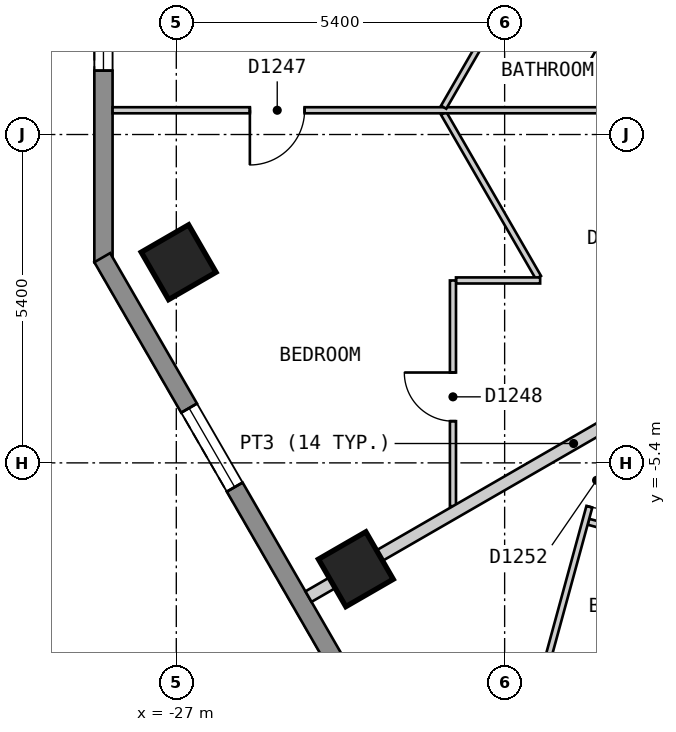
"""IFC4 building model, lengths in metres.
Left out: names, types, materials, properties, quantities, classifications, styles, units other than length and angle.
Written with IfcOpenShell. Run it as: python <this file> out.ifc"""

import sys

from ifc_helpers import new_model, si_unit, direction, frame, frame_2d, origin, origin_2d, place, context, subcontext, project, spatial, polyline, rectangle, outline, extrude, element, fill, save


model = new_model("IFC4")
c1 = context("Model", 3, precision=1e-05, world=origin(), true_north=direction((0.0, 1.0)))
c2 = subcontext(c1, "Body", "Model", "MODEL_VIEW")
j1 = project(units=[si_unit("LENGTHUNIT", "METRE"), si_unit("PLANEANGLEUNIT", "RADIAN")], contexts=[c1])
p1 = place(None, origin())
s1 = spatial("IfcSite", under=j1, at=p1, CompositionType="ELEMENT")
p2 = place(p1, origin())
s2 = spatial("IfcBuilding", under=s1, at=p2, CompositionType="ELEMENT")
p3 = place(p2, frame((0.0, 0.0, 117.6)))
s3 = spatial("IfcBuildingStorey", under=s2, at=p3, CompositionType="ELEMENT", Elevation=117.6)
for number, where, z_axis, x_axis in (
    (1, (-26.962, -2.1, 0.0), (0.0, 0.0, 1.0), (0.5, -0.866, 0.0)),
    (2, (-24.047, -7.149, 0.0), (0.0, 0.0, 1.0), (0.5, -0.866, 0.0)),
):
    element("IfcColumn", number, at=place(p3, frame(where, z_axis=z_axis, x_axis=x_axis)), inside=s3, PredefinedType="COLUMN", context=c2, shape_type="SweptSolid", body=[
        extrude(rectangle(XDim=0.9, YDim=0.9, at=origin_2d()), origin(), (0.0, 0.0, 1.0), 3.0),
    ])
p4 = place(p3, frame((-28.198, 2.9, 0.0), z_axis=(0.0, 0.0, 1.0), x_axis=(0.0, -1.0, 0.0)))
e3 = element("IfcWall", 3, at=p4, inside=s3, PredefinedType="SOLIDWALL", context=c2, shape_type="SweptSolid", body=[
    extrude(outline(polyline([(0.0, -0.15), (5.0, -0.15), (4.92, 0.15), (0.08, 0.15), (0.0, -0.15)])), origin(), (0.0, 0.0, 1.0), 2.7),
])
p5 = place(p4, frame((0.65, 0.0, 0.15)))
e4 = element("IfcOpeningElement", 4, at=p5, cuts=e3, PredefinedType="OPENING", context=c2, shape_type="SweptSolid", body=[
    extrude(rectangle(XDim=1.2, YDim=2.1, at=frame_2d((0.6, 1.05))), frame((0.0, 0.16, 0.0), z_axis=(0.0, -1.0, 0.0), x_axis=(1.0, 0.0, 0.0)), (0.0, 0.0, 1.0), 0.32),
])
p6 = place(p3, frame((-28.218, -2.025, 0.0), z_axis=(0.0, 0.0, 1.0), x_axis=(0.500017503135, -0.866015298109, 0.0)))
e5 = element("IfcWall", 5, at=p6, inside=s3, PredefinedType="SOLIDWALL", context=c2, shape_type="SweptSolid", body=[
    extrude(outline(polyline([(0.0, -0.15), (24.711, -0.15), (24.631, 0.15), (0.08, 0.15), (0.0, -0.15)])), origin(), (0.0, 0.0, 1.0), 2.7),
])
p7 = place(p6, frame((2.857, 0.0, 0.15)))
e6 = element("IfcOpeningElement", 6, at=p7, cuts=e5, PredefinedType="OPENING", context=c2, shape_type="SweptSolid", body=[
    extrude(rectangle(XDim=1.5, YDim=2.1, at=frame_2d((0.75, 1.05))), frame((0.0, 0.16, 0.0), z_axis=(0.0, -1.0, 0.0), x_axis=(1.0, 0.0, 0.0)), (0.0, 0.0, 1.0), 0.32),
])
p8 = place(p6, frame((8.689, 0.0, 0.15)))
e7 = element("IfcOpeningElement", 7, at=p8, cuts=e5, PredefinedType="OPENING", context=c2, shape_type="SweptSolid", body=[
    extrude(rectangle(XDim=1.5, YDim=2.1, at=frame_2d((0.75, 1.05))), frame((0.0, 0.16, 0.0), z_axis=(0.0, -1.0, 0.0), x_axis=(1.0, 0.0, 0.0)), (0.0, 0.0, 1.0), 0.32),
])
p9 = place(p6, frame((14.52, 0.0, 0.15)))
e8 = element("IfcOpeningElement", 8, at=p9, cuts=e5, PredefinedType="OPENING", context=c2, shape_type="SweptSolid", body=[
    extrude(rectangle(XDim=1.5, YDim=2.1, at=frame_2d((0.75, 1.05))), frame((0.0, 0.16, 0.0), z_axis=(0.0, -1.0, 0.0), x_axis=(1.0, 0.0, 0.0)), (0.0, 0.0, 1.0), 0.32),
])
p10 = place(p6, frame((20.351, 0.0, 0.15)))
e9 = element("IfcOpeningElement", 9, at=p10, cuts=e5, PredefinedType="OPENING", context=c2, shape_type="SweptSolid", body=[
    extrude(rectangle(XDim=1.5, YDim=2.1, at=frame_2d((0.75, 1.05))), frame((0.0, 0.16, 0.0), z_axis=(0.0, -1.0, 0.0), x_axis=(1.0, 0.0, 0.0)), (0.0, 0.0, 1.0), 0.32),
])
p11 = place(p3, frame((-22.603, 0.349, 0.0), z_axis=(0.0, 0.0, 1.0), x_axis=(0.499930403552, -0.866065581584, 0.0)))
e10 = element("IfcWall", 10, at=p11, inside=s3, PredefinedType="PARTITIONING", context=c2, shape_type="SweptSolid", body=[
    extrude(rectangle(XDim=3.117, YDim=0.1, at=frame_2d((1.558, 0.0))), origin(), (0.0, 0.0, 1.0), 2.7),
])
p12 = place(p3, frame((-20.222, -6.368, 0.0), z_axis=(0.0, 0.0, 1.0), x_axis=(0.964827681618, -0.262883139024, 0.0)))
e11 = element("IfcWall", 11, at=p12, inside=s3, PredefinedType="PARTITIONING", context=c2, shape_type="SweptSolid", body=[
    extrude(rectangle(XDim=1.94, YDim=0.1, at=frame_2d((0.97, 0.0))), origin(), (0.0, 0.0, 1.0), 2.7),
])
p13 = place(p12, frame((0.597, 0.0, 0.0)))
e12 = element("IfcOpeningElement", 12, at=p13, cuts=e11, PredefinedType="OPENING", context=c2, shape_type="SweptSolid", body=[
    extrude(rectangle(XDim=0.8, YDim=2.1, at=frame_2d((0.4, 1.05))), frame((0.0, 0.06, 0.0), z_axis=(0.0, -1.0, 0.0), x_axis=(1.0, 0.0, 0.0)), (0.0, 0.0, 1.0), 0.12),
])
p14 = place(p3, frame((-21.231, 2.726, 0.0), z_axis=(0.0, 0.0, 1.0), x_axis=(0.867314299312, -0.497760892607, 0.0)))
e13 = element("IfcWall", 13, at=p14, inside=s3, PredefinedType="PARTITIONING", context=c2, shape_type="SweptSolid", body=[
    extrude(rectangle(XDim=4.05, YDim=0.1, at=frame_2d((2.025, 0.0))), origin(), (0.0, 0.0, 1.0), 2.7),
])
p15 = place(p14, frame((1.65, 0.0, 0.0)))
e14 = element("IfcOpeningElement", 14, at=p15, cuts=e13, PredefinedType="OPENING", context=c2, shape_type="SweptSolid", body=[
    extrude(rectangle(XDim=0.8, YDim=2.1, at=frame_2d((0.4, 1.05))), frame((0.0, 0.06, 0.0), z_axis=(0.0, -1.0, 0.0), x_axis=(1.0, 0.0, 0.0)), (0.0, 0.0, 1.0), 0.12),
])
p16 = place(p3, frame((-22.4, -2.4, 0.0), z_axis=(0.0, 0.0, 1.0), x_axis=(1.0, 0.0, 0.0)))
e15 = element("IfcWall", 15, at=p16, inside=s3, PredefinedType="PARTITIONING", context=c2, shape_type="SweptSolid", body=[
    extrude(rectangle(XDim=1.384, YDim=0.1, at=frame_2d((0.692, 0.0))), origin(), (0.0, 0.0, 1.0), 2.7),
])
p17 = place(p3, frame((-28.048, 0.399, 0.0), z_axis=(0.0, 0.0, 1.0), x_axis=(1.0, 0.0, 0.0)))
e16 = element("IfcWall", 16, at=p17, inside=s3, PredefinedType="PARTITIONING", context=c2, shape_type="SweptSolid", body=[
    extrude(rectangle(XDim=10.266, YDim=0.1, at=frame_2d((5.133, 0.0))), origin(), (0.0, 0.0, 1.0), 2.7),
])
p18 = place(p17, frame((2.258, 0.0, 0.0)))
e17 = element("IfcOpeningElement", 17, at=p18, cuts=e16, PredefinedType="OPENING", context=c2, shape_type="SweptSolid", body=[
    extrude(rectangle(XDim=0.9, YDim=2.1, at=frame_2d((0.45, 1.05))), frame((0.0, 0.06, 0.0), z_axis=(0.0, -1.0, 0.0), x_axis=(1.0, 0.0, 0.0)), (0.0, 0.0, 1.0), 0.12),
])
p19 = place(p3, frame((-22.603, 0.449, 0.0), z_axis=(0.0, 0.0, 1.0), x_axis=(0.500022588228, 0.866012362072, 0.0)))
e18 = element("IfcWall", 18, at=p19, inside=s3, PredefinedType="PARTITIONING", context=c2, shape_type="SweptSolid", body=[
    extrude(rectangle(XDim=5.328, YDim=0.1, at=frame_2d((2.664, 0.0))), origin(), (0.0, 0.0, 1.0), 2.7),
])
p20 = place(p19, frame((3.058, 0.0, 0.0)))
e19 = element("IfcOpeningElement", 19, at=p20, cuts=e18, PredefinedType="OPENING", context=c2, shape_type="SweptSolid", body=[
    extrude(rectangle(XDim=0.9, YDim=2.1, at=frame_2d((0.45, 1.05))), frame((0.0, 0.06, 0.0), z_axis=(0.0, -1.0, 0.0), x_axis=(1.0, 0.0, 0.0)), (0.0, 0.0, 1.0), 0.12),
])
p21 = place(p3, frame((-20.878, -8.583, 0.0), z_axis=(0.0, 0.0, 1.0), x_axis=(0.263144077993, 0.964756546605, 0.0)))
e20 = element("IfcWall", 20, at=p21, inside=s3, PredefinedType="PARTITIONING", context=c2, shape_type="SweptSolid", body=[
    extrude(rectangle(XDim=3.873, YDim=0.1, at=frame_2d((1.936, 0.0))), origin(), (0.0, 0.0, 1.0), 2.7),
])
p22 = place(p21, frame((2.552, 0.0, 0.0)))
e21 = element("IfcOpeningElement", 21, at=p22, cuts=e20, PredefinedType="OPENING", context=c2, shape_type="SweptSolid", body=[
    extrude(rectangle(XDim=0.9, YDim=2.1, at=frame_2d((0.45, 1.05))), frame((0.0, 0.06, 0.0), z_axis=(0.0, -1.0, 0.0), x_axis=(1.0, 0.0, 0.0)), (0.0, 0.0, 1.0), 0.12),
])
p23 = place(p3, frame((-22.45, -6.112, 0.0), z_axis=(0.0, 0.0, 1.0), x_axis=(0.0, 1.0, 0.0)))
e22 = element("IfcWall", 22, at=p23, inside=s3, PredefinedType="PARTITIONING", context=c2, shape_type="SweptSolid", body=[
    extrude(rectangle(XDim=3.712, YDim=0.1, at=frame_2d((1.856, 0.0))), origin(), (0.0, 0.0, 1.0), 2.7),
])
p24 = place(p23, frame((1.398, 0.0, 0.0)))
e23 = element("IfcOpeningElement", 23, at=p24, cuts=e22, PredefinedType="OPENING", context=c2, shape_type="SweptSolid", body=[
    extrude(rectangle(XDim=0.8, YDim=2.1, at=frame_2d((0.4, 1.05))), frame((0.0, 0.06, 0.0), z_axis=(0.0, -1.0, 0.0), x_axis=(1.0, 0.0, 0.0)), (0.0, 0.0, 1.0), 0.12),
])
p25 = place(p3, frame((-24.826, -7.599, 0.0), z_axis=(0.0, 0.0, 1.0), x_axis=(0.86599621094, 0.500050560081, 0.0)))
e24 = element("IfcWall", 24, at=p25, inside=s3, PredefinedType="PARTITIONING", context=c2, shape_type="SweptSolid", body=[
    extrude(rectangle(XDim=10.069, YDim=0.2, at=frame_2d((5.035, 0.0))), origin(), (0.0, 0.0, 1.0), 2.7),
])
p26 = place(p5, origin())
e25 = element("IfcWindow", 25, at=p26, inside=s3, PartitioningType="SINGLE_PANEL", PredefinedType="WINDOW", context=c2, shape_type="SweptSolid", body=[
    extrude(rectangle(XDim=1.2, YDim=2.1, at=frame_2d((0.6, 1.05))), frame((0.0, 0.03, 0.0), z_axis=(0.0, -1.0, 0.0), x_axis=(1.0, 0.0, 0.0)), (0.0, 0.0, 1.0), 0.06),
])
fill(e4, e25)
p27 = place(p7, origin())
e26 = element("IfcWindow", 26, at=p27, inside=s3, PartitioningType="SINGLE_PANEL", PredefinedType="WINDOW", context=c2, shape_type="SweptSolid", body=[
    extrude(rectangle(XDim=1.5, YDim=2.1, at=frame_2d((0.75, 1.05))), frame((0.0, 0.03, 0.0), z_axis=(0.0, -1.0, 0.0), x_axis=(1.0, 0.0, 0.0)), (0.0, 0.0, 1.0), 0.06),
])
fill(e6, e26)
p28 = place(p18, origin())
e27 = element("IfcDoor", 27, at=p28, inside=s3, OperationType="SINGLE_SWING_LEFT", PredefinedType="DOOR", context=c2, shape_type="SweptSolid", body=[
    extrude(rectangle(XDim=0.9, YDim=2.1, at=frame_2d((0.45, 1.05))), frame((0.0, 0.025, 0.0), z_axis=(0.0, -1.0, 0.0), x_axis=(1.0, 0.0, 0.0)), (0.0, 0.0, 1.0), 0.05),
])
fill(e17, e27)
p29 = place(p24, origin())
e28 = element("IfcDoor", 28, at=p29, inside=s3, OperationType="SINGLE_SWING_RIGHT", PredefinedType="DOOR", context=c2, shape_type="SweptSolid", body=[
    extrude(rectangle(XDim=0.8, YDim=2.1, at=frame_2d((0.4, 1.05))), frame((0.0, 0.025, 0.0), z_axis=(0.0, -1.0, 0.0), x_axis=(1.0, 0.0, 0.0)), (0.0, 0.0, 1.0), 0.05),
])
fill(e23, e28)
p30 = place(p22, origin())
e29 = element("IfcDoor", 29, at=p30, inside=s3, OperationType="SINGLE_SWING_RIGHT", PredefinedType="DOOR", context=c2, shape_type="SweptSolid", body=[
    extrude(rectangle(XDim=0.9, YDim=2.1, at=frame_2d((0.45, 1.05))), frame((0.0, 0.025, 0.0), z_axis=(0.0, -1.0, 0.0), x_axis=(1.0, 0.0, 0.0)), (0.0, 0.0, 1.0), 0.05),
])
fill(e21, e29)
save(model, sys.argv[1])
